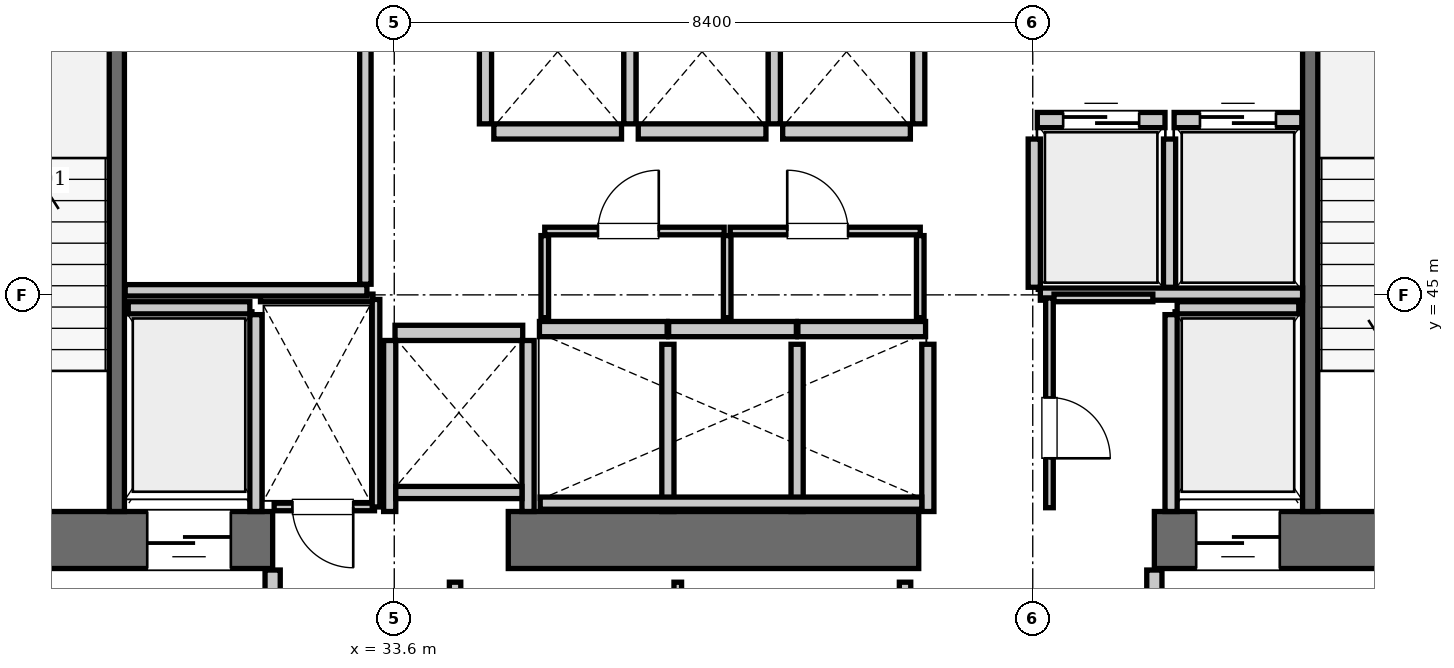
"""IFC4 building model, lengths in metres.
Left out: names, types, materials, properties, quantities, classifications, styles, units other than length and angle.
Written with IfcOpenShell. Run it as: python <this file> out.ifc"""

import sys

from ifc_helpers import new_model, si_unit, direction, frame, frame_2d, origin, place, context, subcontext, project, spatial, rectangle, extrude, element, fill, save


model = new_model("IFC4")
c1 = context("Model", 3, precision=1e-05, world=origin(), true_north=direction((0.0, 1.0)))
c2 = subcontext(c1, "Body", "Model", "MODEL_VIEW")
j1 = project(units=[si_unit("LENGTHUNIT", "METRE"), si_unit("PLANEANGLEUNIT", "RADIAN")], contexts=[c1])
p1 = place(None, origin())
s1 = spatial("IfcSite", under=j1, at=p1, CompositionType="ELEMENT")
p2 = place(p1, origin())
s2 = spatial("IfcBuilding", under=s1, at=p2, CompositionType="ELEMENT")
p3 = place(p2, frame((0.0, 0.0, 158.2)))
s3 = spatial("IfcBuildingStorey", under=s2, at=p3, CompositionType="ELEMENT", Elevation=158.2)
p4 = place(p3, frame((25.2, 41.775, 0.0), z_axis=(0.0, 0.0, 1.0), x_axis=(1.0, 0.0, 0.0)))
e1 = element("IfcWall", 1, at=p4, inside=s3, PredefinedType="SHEAR", context=c2, shape_type="SweptSolid", body=[
    extrude(rectangle(XDim=6.8, YDim=0.75, at=frame_2d((3.4, 0.0))), origin(), (0.0, 0.0, 1.0), 3.85),
])
p5 = place(p4, frame((1.65, 0.0, 0.0)))
e2 = element("IfcOpeningElement", 2, at=p5, cuts=e1, PredefinedType="OPENING", context=c2, shape_type="SweptSolid", body=[
    extrude(rectangle(XDim=1.15, YDim=2.15, at=frame_2d((0.575, 1.075))), frame((0.0, 0.385, 0.0), z_axis=(0.0, -1.0, 0.0), x_axis=(1.0, 0.0, 0.0)), (0.0, 0.0, 1.0), 0.77),
])
p6 = place(p4, frame((5.15, 0.0, 0.0)))
e3 = element("IfcOpeningElement", 3, at=p6, cuts=e1, PredefinedType="OPENING", context=c2, shape_type="SweptSolid", body=[
    extrude(rectangle(XDim=1.1, YDim=2.2, at=frame_2d((0.55, 1.1))), frame((0.0, 0.385, 0.0), z_axis=(0.0, -1.0, 0.0), x_axis=(1.0, 0.0, 0.0)), (0.0, 0.0, 1.0), 0.77),
])
p7 = place(p3, frame((35.1, 41.775, 0.0), z_axis=(0.0, 0.0, 1.0), x_axis=(1.0, 0.0, 0.0)))
e4 = element("IfcWall", 4, at=p7, inside=s3, PredefinedType="SHEAR", context=c2, shape_type="SweptSolid", body=[
    extrude(rectangle(XDim=5.4, YDim=0.75, at=frame_2d((2.7, 0.0))), origin(), (0.0, 0.0, 1.0), 3.85),
])
p8 = place(p3, frame((43.6, 41.775, 0.0), z_axis=(0.0, 0.0, 1.0), x_axis=(1.0, 0.0, 0.0)))
e5 = element("IfcWall", 5, at=p8, inside=s3, PredefinedType="SHEAR", context=c2, shape_type="SweptSolid", body=[
    extrude(rectangle(XDim=6.8, YDim=0.75, at=frame_2d((3.4, 0.0))), origin(), (0.0, 0.0, 1.0), 3.85),
])
p9 = place(p8, frame((3.9, 0.0, 0.0)))
e6 = element("IfcOpeningElement", 6, at=p9, cuts=e5, PredefinedType="OPENING", context=c2, shape_type="SweptSolid", body=[
    extrude(rectangle(XDim=1.15, YDim=2.15, at=frame_2d((0.575, 1.075))), frame((0.0, 0.385, 0.0), z_axis=(0.0, -1.0, 0.0), x_axis=(1.0, 0.0, 0.0)), (0.0, 0.0, 1.0), 0.77),
])
p10 = place(p8, frame((0.55, 0.0, 0.0)))
e7 = element("IfcOpeningElement", 7, at=p10, cuts=e5, PredefinedType="OPENING", context=c2, shape_type="SweptSolid", body=[
    extrude(rectangle(XDim=1.1, YDim=2.2, at=frame_2d((0.55, 1.1))), frame((0.0, 0.385, 0.0), z_axis=(0.0, -1.0, 0.0), x_axis=(1.0, 0.0, 0.0)), (0.0, 0.0, 1.0), 0.77),
])
for number, where, z_axis, x_axis in (
    (8, (29.95, 42.15, 0.0), (0.0, 0.0, 1.0), (0.0, 1.0, 0.0)),
    (9, (45.65, 42.15, 0.0), (0.0, 0.0, 1.0), (0.0, 1.0, 0.0)),
):
    element("IfcWall", number, at=place(p3, frame(where, z_axis=z_axis, x_axis=x_axis)), inside=s3, PredefinedType="SOLIDWALL", context=c2, shape_type="SweptSolid", body=[
        extrude(rectangle(XDim=9.0, YDim=0.2, at=frame_2d((4.5, 0.0))), origin(), (0.0, 0.0, 1.0), 3.61),
    ])
p11 = place(p3, frame((42.06, 47.3, 0.0), z_axis=(0.0, 0.0, 1.0), x_axis=(1.0, 0.0, 0.0)))
e10 = element("IfcWall", 10, at=p11, inside=s3, PredefinedType="SOLIDWALL", context=c2, shape_type="SweptSolid", body=[
    extrude(rectangle(XDim=1.68, YDim=0.2, at=frame_2d((0.84, 0.0))), origin(), (0.0, 0.0, 1.0), 3.61),
])
p12 = place(p11, frame((0.34, 0.0, 0.0)))
e11 = element("IfcOpeningElement", 11, at=p12, cuts=e10, PredefinedType="OPENING", context=c2, shape_type="SweptSolid", body=[
    extrude(rectangle(XDim=1.0, YDim=2.15, at=frame_2d((0.5, 1.075))), frame((0.0, 0.11, 0.0), z_axis=(0.0, -1.0, 0.0), x_axis=(1.0, 0.0, 0.0)), (0.0, 0.0, 1.0), 0.22),
])
p13 = place(p3, frame((43.86, 47.3, 0.0), z_axis=(0.0, 0.0, 1.0), x_axis=(1.0, 0.0, 0.0)))
e12 = element("IfcWall", 12, at=p13, inside=s3, PredefinedType="SOLIDWALL", context=c2, shape_type="SweptSolid", body=[
    extrude(rectangle(XDim=1.68, YDim=0.2, at=frame_2d((0.84, 0.0))), origin(), (0.0, 0.0, 1.0), 3.61),
])
p14 = place(p13, frame((0.34, 0.0, 0.0)))
e13 = element("IfcOpeningElement", 13, at=p14, cuts=e12, PredefinedType="OPENING", context=c2, shape_type="SweptSolid", body=[
    extrude(rectangle(XDim=1.0, YDim=2.15, at=frame_2d((0.5, 1.075))), frame((0.0, 0.11, 0.0), z_axis=(0.0, -1.0, 0.0), x_axis=(1.0, 0.0, 0.0)), (0.0, 0.0, 1.0), 0.22),
])
for number, where, z_axis, x_axis in (
    (14, (35.51, 44.55, 0.0), (0.0, 0.0, 1.0), (1.0, 0.0, 0.0)),
    (15, (37.21, 44.55, 0.0), (0.0, 0.0, 1.0), (1.0, 0.0, 0.0)),
):
    element("IfcWall", number, at=place(p3, frame(where, z_axis=z_axis, x_axis=x_axis)), inside=s3, PredefinedType="SOLIDWALL", context=c2, shape_type="SweptSolid", body=[
        extrude(rectangle(XDim=1.68, YDim=0.2, at=frame_2d((0.84, 0.0))), origin(), (0.0, 0.0, 1.0), 3.61),
    ])
for number, where, z_axis, x_axis in (
    (16, (38.91, 44.55, 0.0), (0.0, 0.0, 1.0), (1.0, 0.0, 0.0)),
    (17, (34.91, 47.15, 0.0), (0.0, 0.0, 1.0), (1.0, 0.0, 0.0)),
):
    element("IfcWall", number, at=place(p3, frame(where, z_axis=z_axis, x_axis=x_axis)), inside=s3, PredefinedType="SOLIDWALL", context=c2, shape_type="SweptSolid", body=[
        extrude(rectangle(XDim=1.68, YDim=0.2, at=frame_2d((0.84, 0.0))), origin(), (0.0, 0.0, 1.0), 3.61),
    ])
for number, where, z_axis, x_axis in (
    (18, (36.81, 47.15, 0.0), (0.0, 0.0, 1.0), (1.0, 0.0, 0.0)),
    (19, (38.71, 47.15, 0.0), (0.0, 0.0, 1.0), (1.0, 0.0, 0.0)),
    (20, (33.61, 44.5, 0.0), (0.0, 0.0, 1.0), (1.0, 0.0, 0.0)),
):
    element("IfcWall", number, at=place(p3, frame(where, z_axis=z_axis, x_axis=x_axis)), inside=s3, PredefinedType="SOLIDWALL", context=c2, shape_type="SweptSolid", body=[
        extrude(rectangle(XDim=1.68, YDim=0.2, at=frame_2d((0.84, 0.0))), origin(), (0.0, 0.0, 1.0), 3.61),
    ])
p15 = place(p3, frame((30.1, 44.83, 0.0), z_axis=(0.0, 0.0, 1.0), x_axis=(1.0, 0.0, 0.0)))
e21 = element("IfcWall", 21, at=p15, inside=s3, PredefinedType="SOLIDWALL", context=c2, shape_type="SweptSolid", body=[
    extrude(rectangle(XDim=1.6, YDim=0.16, at=frame_2d((0.8, 0.0))), origin(), (0.0, 0.0, 1.0), 3.61),
])
p16 = place(p3, frame((31.78, 42.15, 0.0), z_axis=(0.0, 0.0, 1.0), x_axis=(0.0, 1.0, 0.0)))
e22 = element("IfcWall", 22, at=p16, inside=s3, PredefinedType="SOLIDWALL", context=c2, shape_type="SweptSolid", body=[
    extrude(rectangle(XDim=2.59, YDim=0.16, at=frame_2d((1.295, 0.0))), origin(), (0.0, 0.0, 1.0), 3.61),
])
p17 = place(p3, frame((43.9, 44.83, 0.0), z_axis=(0.0, 0.0, 1.0), x_axis=(1.0, 0.0, 0.0)))
e23 = element("IfcWall", 23, at=p17, inside=s3, PredefinedType="SOLIDWALL", context=c2, shape_type="SweptSolid", body=[
    extrude(rectangle(XDim=1.6, YDim=0.16, at=frame_2d((0.8, 0.0))), origin(), (0.0, 0.0, 1.0), 3.61),
])
p18 = place(p3, frame((43.82, 42.15, 0.0), z_axis=(0.0, 0.0, 1.0), x_axis=(0.0, 1.0, 0.0)))
e24 = element("IfcWall", 24, at=p18, inside=s3, PredefinedType="SOLIDWALL", context=c2, shape_type="SweptSolid", body=[
    extrude(rectangle(XDim=2.59, YDim=0.16, at=frame_2d((1.295, 0.0))), origin(), (0.0, 0.0, 1.0), 3.61),
])
for number, where, z_axis, x_axis in (
    (25, (42.02, 45.1, 0.0), (0.0, 0.0, 1.0), (0.0, 1.0, 0.0)),
    (26, (43.8, 45.1, 0.0), (0.0, 0.0, 1.0), (0.0, 1.0, 0.0)),
):
    element("IfcWall", number, at=place(p3, frame(where, z_axis=z_axis, x_axis=x_axis)), inside=s3, PredefinedType="SOLIDWALL", context=c2, shape_type="SweptSolid", body=[
        extrude(rectangle(XDim=1.95, YDim=0.16, at=frame_2d((0.975, 0.0))), origin(), (0.0, 0.0, 1.0), 3.61),
    ])
p19 = place(p3, frame((42.1, 45.01, 0.0), z_axis=(0.0, 0.0, 1.0), x_axis=(1.0, 0.0, 0.0)))
e27 = element("IfcWall", 27, at=p19, inside=s3, PredefinedType="SOLIDWALL", context=c2, shape_type="SweptSolid", body=[
    extrude(rectangle(XDim=3.45, YDim=0.16, at=frame_2d((1.725, 0.0))), origin(), (0.0, 0.0, 1.0), 3.61),
])
for number, where, z_axis, x_axis in (
    (28, (37.2, 42.15, 0.0), (0.0, 0.0, 1.0), (0.0, 1.0, 0.0)),
    (29, (38.9, 42.15, 0.0), (0.0, 0.0, 1.0), (0.0, 1.0, 0.0)),
    (30, (40.62, 42.15, 0.0), (0.0, 0.0, 1.0), (0.0, 1.0, 0.0)),
):
    element("IfcWall", number, at=place(p3, frame(where, z_axis=z_axis, x_axis=x_axis)), inside=s3, PredefinedType="SOLIDWALL", context=c2, shape_type="SweptSolid", body=[
        extrude(rectangle(XDim=2.2, YDim=0.16, at=frame_2d((1.1, 0.0))), origin(), (0.0, 0.0, 1.0), 3.61),
    ])
p20 = place(p3, frame((35.52, 42.26, 0.0), z_axis=(0.0, 0.0, 1.0), x_axis=(1.0, 0.0, 0.0)))
e31 = element("IfcWall", 31, at=p20, inside=s3, PredefinedType="SOLIDWALL", context=c2, shape_type="SweptSolid", body=[
    extrude(rectangle(XDim=5.02, YDim=0.16, at=frame_2d((2.51, 0.0))), origin(), (0.0, 0.0, 1.0), 3.61),
])
for number, where, z_axis, x_axis in (
    (32, (34.8, 47.25, 0.0), (0.0, 0.0, 1.0), (0.0, 1.0, 0.0)),
    (33, (36.7, 47.25, 0.0), (0.0, 0.0, 1.0), (0.0, 1.0, 0.0)),
    (34, (38.6, 47.25, 0.0), (0.0, 0.0, 1.0), (0.0, 1.0, 0.0)),
    (35, (40.5, 47.25, 0.0), (0.0, 0.0, 1.0), (0.0, 1.0, 0.0)),
):
    element("IfcWall", number, at=place(p3, frame(where, z_axis=z_axis, x_axis=x_axis)), inside=s3, PredefinedType="SOLIDWALL", context=c2, shape_type="SweptSolid", body=[
        extrude(rectangle(XDim=2.19, YDim=0.16, at=frame_2d((1.095, 0.0))), origin(), (0.0, 0.0, 1.0), 3.61),
    ])
for number, where, z_axis, x_axis in (
    (36, (33.54, 42.15, 0.0), (0.0, 0.0, 1.0), (0.0, 1.0, 0.0)),
    (37, (35.36, 42.15, 0.0), (0.0, 0.0, 1.0), (0.0, 1.0, 0.0)),
):
    element("IfcWall", number, at=place(p3, frame(where, z_axis=z_axis, x_axis=x_axis)), inside=s3, PredefinedType="SOLIDWALL", context=c2, shape_type="SweptSolid", body=[
        extrude(rectangle(XDim=2.25, YDim=0.16, at=frame_2d((1.125, 0.0))), origin(), (0.0, 0.0, 1.0), 3.61),
    ])
p21 = place(p3, frame((33.62, 42.4, 0.0), z_axis=(0.0, 0.0, 1.0), x_axis=(1.0, 0.0, 0.0)))
e38 = element("IfcWall", 38, at=p21, inside=s3, PredefinedType="SOLIDWALL", context=c2, shape_type="SweptSolid", body=[
    extrude(rectangle(XDim=1.66, YDim=0.16, at=frame_2d((0.83, 0.0))), origin(), (0.0, 0.0, 1.0), 3.61),
])
for number, where, z_axis, x_axis in (
    (39, (32.0, 38.31, 0.0), (0.0, 0.0, 1.0), (0.0, 1.0, 0.0)),
    (40, (43.6, 38.31, 0.0), (0.0, 0.0, 1.0), (0.0, 1.0, 0.0)),
):
    element("IfcWall", number, at=place(p3, frame(where, z_axis=z_axis, x_axis=x_axis)), inside=s3, PredefinedType="PARTITIONING", context=c2, shape_type="SweptSolid", body=[
        extrude(rectangle(XDim=3.07, YDim=0.2, at=frame_2d((1.535, 0.0))), origin(), (0.0, 0.0, 1.0), 3.61),
    ])
p22 = place(p3, frame((32.02, 42.21, 0.0), z_axis=(0.0, 0.0, 1.0), x_axis=(1.0, 0.0, 0.0)))
e41 = element("IfcWall", 41, at=p22, inside=s3, PredefinedType="PARTITIONING", context=c2, shape_type="SweptSolid", body=[
    extrude(rectangle(XDim=1.32, YDim=0.1, at=frame_2d((0.66, 0.0))), origin(), (0.0, 0.0, 1.0), 3.61),
])
p23 = place(p22, frame((0.24, 0.0, 0.0)))
e42 = element("IfcOpeningElement", 42, at=p23, cuts=e41, PredefinedType="OPENING", context=c2, shape_type="SweptSolid", body=[
    extrude(rectangle(XDim=0.8, YDim=2.05, at=frame_2d((0.4, 1.025))), frame((0.0, 0.06, 0.0), z_axis=(0.0, -1.0, 0.0), x_axis=(1.0, 0.0, 0.0)), (0.0, 0.0, 1.0), 0.12),
])
p24 = place(p3, frame((31.84, 44.96, 0.0), z_axis=(0.0, 0.0, 1.0), x_axis=(1.0, 0.0, 0.0)))
e43 = element("IfcWall", 43, at=p24, inside=s3, PredefinedType="PARTITIONING", context=c2, shape_type="SweptSolid", body=[
    extrude(rectangle(XDim=1.48, YDim=0.1, at=frame_2d((0.74, 0.0))), origin(), (0.0, 0.0, 1.0), 3.61),
])
p25 = place(p3, frame((33.36, 42.21, 0.0), z_axis=(0.0, 0.0, 1.0), x_axis=(0.0, 1.0, 0.0)))
e44 = element("IfcWall", 44, at=p25, inside=s3, PredefinedType="PARTITIONING", context=c2, shape_type="SweptSolid", body=[
    extrude(rectangle(XDim=2.73, YDim=0.1, at=frame_2d((1.365, 0.0))), origin(), (0.0, 0.0, 1.0), 3.61),
])
p26 = place(p3, frame((35.58, 45.84, 0.0), z_axis=(0.0, 0.0, 1.0), x_axis=(1.0, 0.0, 0.0)))
e45 = element("IfcWall", 45, at=p26, inside=s3, PredefinedType="PARTITIONING", context=c2, shape_type="SweptSolid", body=[
    extrude(rectangle(XDim=2.36, YDim=0.1, at=frame_2d((1.18, 0.0))), origin(), (0.0, 0.0, 1.0), 3.61),
])
p27 = place(p26, frame((0.7, 0.0, 0.0)))
e46 = element("IfcOpeningElement", 46, at=p27, cuts=e45, PredefinedType="OPENING", context=c2, shape_type="SweptSolid", body=[
    extrude(rectangle(XDim=0.8, YDim=2.05, at=frame_2d((0.4, 1.025))), frame((0.0, 0.06, 0.0), z_axis=(0.0, -1.0, 0.0), x_axis=(1.0, 0.0, 0.0)), (0.0, 0.0, 1.0), 0.12),
])
p28 = place(p3, frame((38.02, 45.84, 0.0), z_axis=(0.0, 0.0, 1.0), x_axis=(1.0, 0.0, 0.0)))
e47 = element("IfcWall", 47, at=p28, inside=s3, PredefinedType="PARTITIONING", context=c2, shape_type="SweptSolid", body=[
    extrude(rectangle(XDim=2.5, YDim=0.1, at=frame_2d((1.25, 0.0))), origin(), (0.0, 0.0, 1.0), 3.61),
])
p29 = place(p28, frame((0.75, 0.0, 0.0)))
e48 = element("IfcOpeningElement", 48, at=p29, cuts=e47, PredefinedType="OPENING", context=c2, shape_type="SweptSolid", body=[
    extrude(rectangle(XDim=0.8, YDim=2.05, at=frame_2d((0.4, 1.025))), frame((0.0, 0.06, 0.0), z_axis=(0.0, -1.0, 0.0), x_axis=(1.0, 0.0, 0.0)), (0.0, 0.0, 1.0), 0.12),
])
for number, where, z_axis, x_axis in (
    (49, (35.58, 44.7, 0.0), (0.0, 0.0, 1.0), (0.0, 1.0, 0.0)),
    (50, (37.98, 44.7, 0.0), (0.0, 0.0, 1.0), (0.0, 1.0, 0.0)),
    (51, (40.52, 44.7, 0.0), (0.0, 0.0, 1.0), (0.0, 1.0, 0.0)),
):
    element("IfcWall", number, at=place(p3, frame(where, z_axis=z_axis, x_axis=x_axis)), inside=s3, PredefinedType="PARTITIONING", context=c2, shape_type="SweptSolid", body=[
        extrude(rectangle(XDim=1.08, YDim=0.1, at=frame_2d((0.54, 0.0))), origin(), (0.0, 0.0, 1.0), 3.61),
    ])
p30 = place(p3, frame((42.22, 42.2, 0.0), z_axis=(0.0, 0.0, 1.0), x_axis=(0.0, 1.0, 0.0)))
e52 = element("IfcWall", 52, at=p30, inside=s3, PredefinedType="PARTITIONING", context=c2, shape_type="SweptSolid", body=[
    extrude(rectangle(XDim=2.76, YDim=0.1, at=frame_2d((1.38, 0.0))), origin(), (0.0, 0.0, 1.0), 3.61),
])
p31 = place(p30, frame((0.65, 0.0, 0.0)))
e53 = element("IfcOpeningElement", 53, at=p31, cuts=e52, PredefinedType="OPENING", context=c2, shape_type="SweptSolid", body=[
    extrude(rectangle(XDim=0.8, YDim=2.05, at=frame_2d((0.4, 1.025))), frame((0.0, 0.06, 0.0), z_axis=(0.0, -1.0, 0.0), x_axis=(1.0, 0.0, 0.0)), (0.0, 0.0, 1.0), 0.12),
])
p32 = place(p3, frame((42.28, 44.96, 0.0), z_axis=(0.0, 0.0, 1.0), x_axis=(1.0, 0.0, 0.0)))
e54 = element("IfcWall", 54, at=p32, inside=s3, PredefinedType="PARTITIONING", context=c2, shape_type="SweptSolid", body=[
    extrude(rectangle(XDim=1.3, YDim=0.1, at=frame_2d((0.65, 0.0))), origin(), (0.0, 0.0, 1.0), 3.61),
])
p33 = place(p3, frame((30.06, 45.06, 0.0), z_axis=(0.0, 0.0, 1.0), x_axis=(1.0, 0.0, 0.0)))
e55 = element("IfcWall", 55, at=p33, inside=s3, PredefinedType="PARTITIONING", context=c2, shape_type="SweptSolid", body=[
    extrude(rectangle(XDim=3.18, YDim=0.15, at=frame_2d((1.59, 0.0))), origin(), (0.0, 0.0, 1.0), 3.61),
])
p34 = place(p3, frame((33.22, 45.14, 0.0), z_axis=(0.0, 0.0, 1.0), x_axis=(0.0, 1.0, 0.0)))
e56 = element("IfcWall", 56, at=p34, inside=s3, PredefinedType="PARTITIONING", context=c2, shape_type="SweptSolid", body=[
    extrude(rectangle(XDim=4.16, YDim=0.15, at=frame_2d((2.08, 0.0))), origin(), (0.0, 0.0, 1.0), 3.61),
])
p35 = place(p3, frame((34.4, 38.38, 0.0), z_axis=(0.0, 0.0, 1.0), x_axis=(0.0, 1.0, 0.0)))
e57 = element("IfcWall", 57, at=p35, inside=s3, PredefinedType="PARTITIONING", context=c2, shape_type="SweptSolid", body=[
    extrude(rectangle(XDim=2.84, YDim=0.15, at=frame_2d((1.42, 0.0))), origin(), (0.0, 0.0, 1.0), 3.61),
])
p36 = place(p3, frame((37.33, 38.38, 0.0), z_axis=(0.0, 0.0, 1.0), x_axis=(0.0, 1.0, 0.0)))
e58 = element("IfcWall", 58, at=p36, inside=s3, PredefinedType="PARTITIONING", context=c2, shape_type="SweptSolid", body=[
    extrude(rectangle(XDim=2.84, YDim=0.1, at=frame_2d((1.42, 0.0))), origin(), (0.0, 0.0, 1.0), 3.61),
])
p37 = place(p3, frame((40.32, 38.38, 0.0), z_axis=(0.0, 0.0, 1.0), x_axis=(0.0, 1.0, 0.0)))
e59 = element("IfcWall", 59, at=p37, inside=s3, PredefinedType="PARTITIONING", context=c2, shape_type="SweptSolid", body=[
    extrude(rectangle(XDim=2.84, YDim=0.15, at=frame_2d((1.42, 0.0))), origin(), (0.0, 0.0, 1.0), 3.61),
])
p38 = place(p12, origin())
e60 = element("IfcDoor", 60, at=p38, inside=s3, OperationType="SLIDING_TO_LEFT", PredefinedType="DOOR", context=c2, shape_type="SweptSolid", body=[
    extrude(rectangle(XDim=1.0, YDim=2.15, at=frame_2d((0.5, 1.075))), frame((0.0, 0.025, 0.0), z_axis=(0.0, -1.0, 0.0), x_axis=(1.0, 0.0, 0.0)), (0.0, 0.0, 1.0), 0.05),
])
fill(e11, e60)
p39 = place(p14, origin())
e61 = element("IfcDoor", 61, at=p39, inside=s3, OperationType="SLIDING_TO_LEFT", PredefinedType="DOOR", context=c2, shape_type="SweptSolid", body=[
    extrude(rectangle(XDim=1.0, YDim=2.15, at=frame_2d((0.5, 1.075))), frame((0.0, 0.025, 0.0), z_axis=(0.0, -1.0, 0.0), x_axis=(1.0, 0.0, 0.0)), (0.0, 0.0, 1.0), 0.05),
])
fill(e13, e61)
p40 = place(p6, frame((1.1, 0.0, 0.0), z_axis=(0.0, 0.0, 1.0), x_axis=(-1.0, 0.0, 0.0)))
e62 = element("IfcDoor", 62, at=p40, inside=s3, OperationType="SLIDING_TO_LEFT", PredefinedType="DOOR", context=c2, shape_type="SweptSolid", body=[
    extrude(rectangle(XDim=1.1, YDim=2.2, at=frame_2d((0.55, 1.1))), frame((0.0, 0.025, 0.0), z_axis=(0.0, -1.0, 0.0), x_axis=(1.0, 0.0, 0.0)), (0.0, 0.0, 1.0), 0.05),
])
fill(e3, e62)
p41 = place(p10, frame((1.1, 0.0, 0.0), z_axis=(0.0, 0.0, 1.0), x_axis=(-1.0, 0.0, 0.0)))
e63 = element("IfcDoor", 63, at=p41, inside=s3, OperationType="SLIDING_TO_LEFT", PredefinedType="DOOR", context=c2, shape_type="SweptSolid", body=[
    extrude(rectangle(XDim=1.1, YDim=2.2, at=frame_2d((0.55, 1.1))), frame((0.0, 0.025, 0.0), z_axis=(0.0, -1.0, 0.0), x_axis=(1.0, 0.0, 0.0)), (0.0, 0.0, 1.0), 0.05),
])
fill(e7, e63)
p42 = place(p23, frame((0.8, 0.0, 0.0), z_axis=(0.0, 0.0, 1.0), x_axis=(-1.0, 0.0, 0.0)))
e64 = element("IfcDoor", 64, at=p42, inside=s3, OperationType="SINGLE_SWING_LEFT", PredefinedType="DOOR", context=c2, shape_type="SweptSolid", body=[
    extrude(rectangle(XDim=0.8, YDim=2.05, at=frame_2d((0.4, 1.025))), frame((0.0, 0.025, 0.0), z_axis=(0.0, -1.0, 0.0), x_axis=(1.0, 0.0, 0.0)), (0.0, 0.0, 1.0), 0.05),
])
fill(e42, e64)
p43 = place(p27, origin())
e65 = element("IfcDoor", 65, at=p43, inside=s3, OperationType="SINGLE_SWING_RIGHT", PredefinedType="DOOR", context=c2, shape_type="SweptSolid", body=[
    extrude(rectangle(XDim=0.8, YDim=2.05, at=frame_2d((0.4, 1.025))), frame((0.0, 0.025, 0.0), z_axis=(0.0, -1.0, 0.0), x_axis=(1.0, 0.0, 0.0)), (0.0, 0.0, 1.0), 0.05),
])
fill(e46, e65)
p44 = place(p29, origin())
e66 = element("IfcDoor", 66, at=p44, inside=s3, OperationType="SINGLE_SWING_LEFT", PredefinedType="DOOR", context=c2, shape_type="SweptSolid", body=[
    extrude(rectangle(XDim=0.8, YDim=2.05, at=frame_2d((0.4, 1.025))), frame((0.0, 0.025, 0.0), z_axis=(0.0, -1.0, 0.0), x_axis=(1.0, 0.0, 0.0)), (0.0, 0.0, 1.0), 0.05),
])
fill(e48, e66)
p45 = place(p31, frame((0.8, 0.0, 0.0), z_axis=(0.0, 0.0, 1.0), x_axis=(-1.0, 0.0, 0.0)))
e67 = element("IfcDoor", 67, at=p45, inside=s3, OperationType="SINGLE_SWING_RIGHT", PredefinedType="DOOR", context=c2, shape_type="SweptSolid", body=[
    extrude(rectangle(XDim=0.8, YDim=2.05, at=frame_2d((0.4, 1.025))), frame((0.0, 0.025, 0.0), z_axis=(0.0, -1.0, 0.0), x_axis=(1.0, 0.0, 0.0)), (0.0, 0.0, 1.0), 0.05),
])
fill(e53, e67)
save(model, sys.argv[1])
